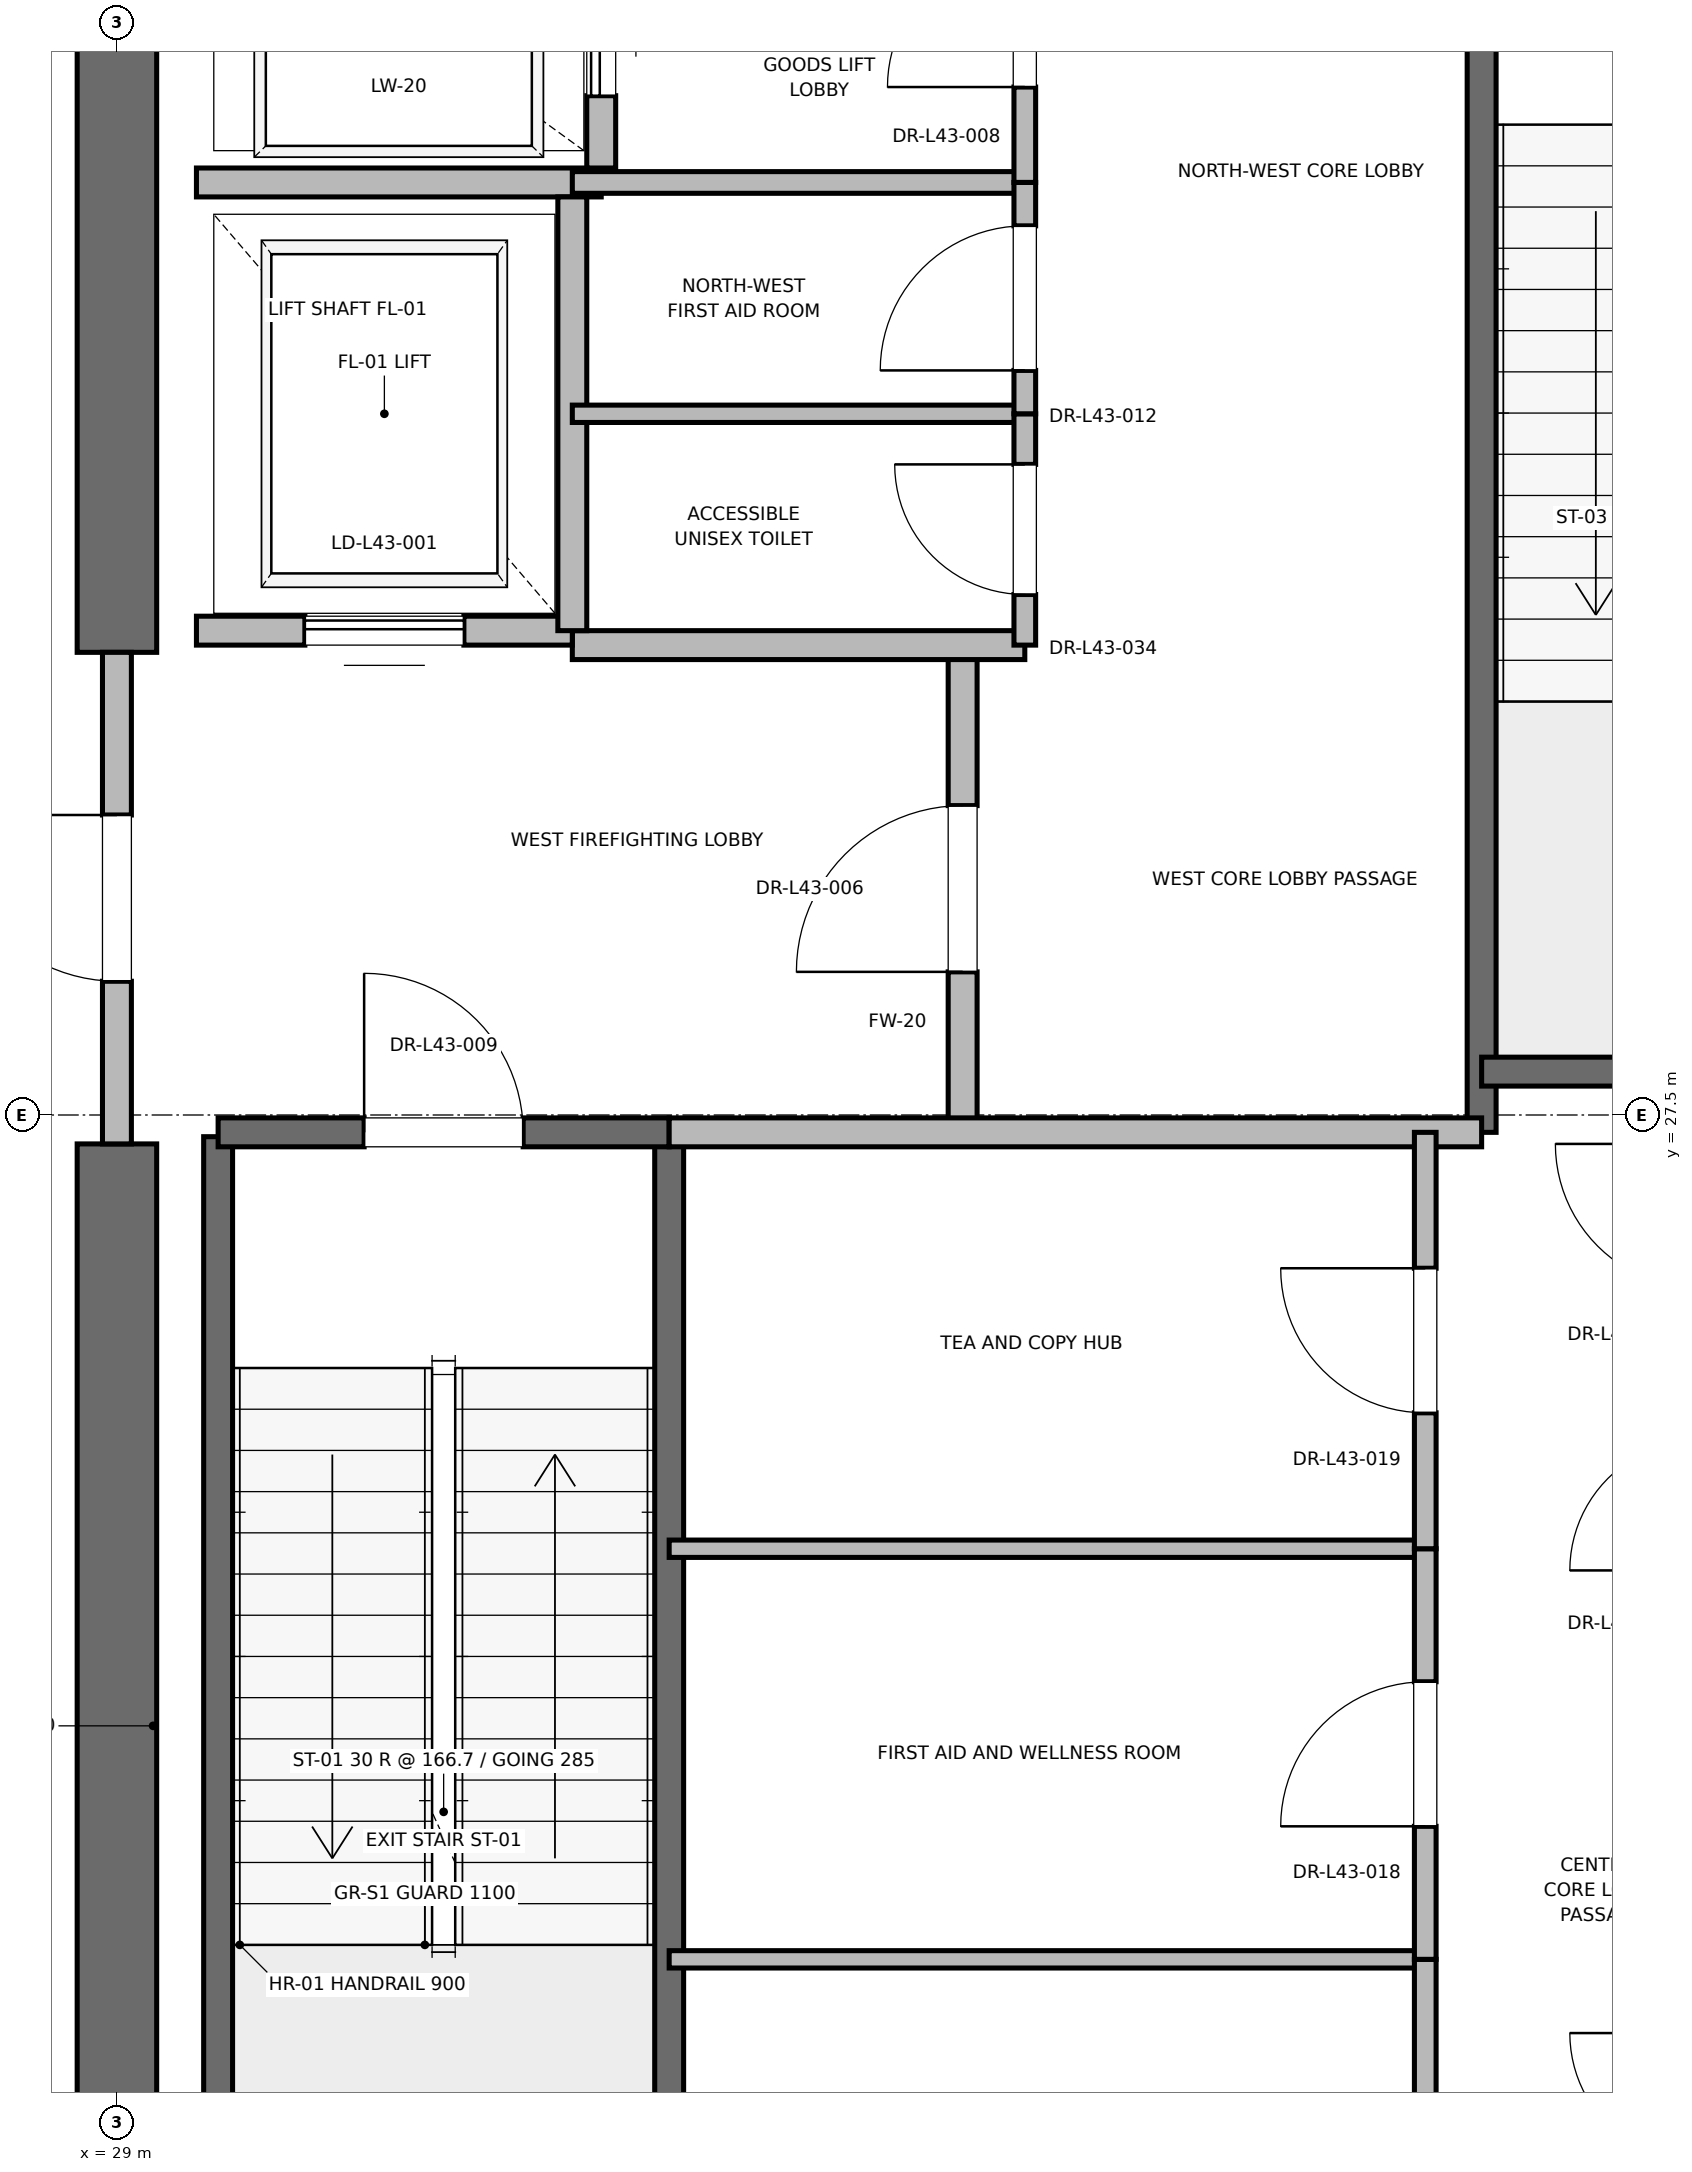
"""IFC4 building model, lengths in metres.
Left out: names, types, materials, properties, quantities, classifications, styles, units other than length and angle.
Written with IfcOpenShell. Run it as: python <this file> out.ifc"""

import sys

from ifc_helpers import new_model, si_unit, direction, frame, frame_2d, origin, place, context, subcontext, project, spatial, rectangle, extrude, element, fill, save


model = new_model("IFC4")
c1 = context("Model", 3, precision=1e-05, world=origin(), true_north=direction((0.0, 1.0)))
c2 = subcontext(c1, "Body", "Model", "MODEL_VIEW")
j1 = project(units=[si_unit("LENGTHUNIT", "METRE"), si_unit("PLANEANGLEUNIT", "RADIAN")], contexts=[c1])
p1 = place(None, origin())
s1 = spatial("IfcSite", under=j1, at=p1, CompositionType="ELEMENT")
p2 = place(p1, origin())
s2 = spatial("IfcBuilding", under=s1, at=p2, CompositionType="ELEMENT")
p3 = place(p2, frame((0.0, 0.0, 184.4)))
s3 = spatial("IfcBuildingStorey", under=s2, at=p3, CompositionType="ELEMENT", Elevation=184.4)
p4 = place(p3, frame((29.0, 18.5, 0.0), z_axis=(0.0, 0.0, 1.0), x_axis=(0.0, 1.0, 0.0)))
e1 = element("IfcWall", 1, at=p4, inside=s3, PredefinedType="SHEAR", context=c2, shape_type="SweptSolid", body=[
    extrude(rectangle(XDim=8.8, YDim=0.55, at=frame_2d((4.4, 0.0))), origin(), (0.0, 0.0, 1.0), 4.7),
])
p5 = place(p3, frame((29.0, 30.7, 0.0), z_axis=(0.0, 0.0, 1.0), x_axis=(0.0, 1.0, 0.0)))
e2 = element("IfcWall", 2, at=p5, inside=s3, PredefinedType="SHEAR", context=c2, shape_type="SweptSolid", body=[
    extrude(rectangle(XDim=5.8, YDim=0.55, at=frame_2d((2.9, 0.0))), origin(), (0.0, 0.0, 1.0), 4.7),
])
p6 = place(p3, frame((29.7, 19.2, 0.0), z_axis=(0.0, 0.0, 1.0), x_axis=(0.0, 1.0, 0.0)))
e3 = element("IfcWall", 3, at=p6, inside=s3, PredefinedType="SOLIDWALL", context=c2, shape_type="SweptSolid", body=[
    extrude(rectangle(XDim=8.15, YDim=0.2, at=frame_2d((4.075, 0.0))), origin(), (0.0, 0.0, 1.0), 4.7),
])
p7 = place(p3, frame((32.82, 18.6, 0.0), z_axis=(0.0, 0.0, 1.0), x_axis=(0.0, 1.0, 0.0)))
e4 = element("IfcWall", 4, at=p7, inside=s3, PredefinedType="SOLIDWALL", context=c2, shape_type="SweptSolid", body=[
    extrude(rectangle(XDim=8.78, YDim=0.2, at=frame_2d((4.39, 0.0))), origin(), (0.0, 0.0, 1.0), 4.7),
])
p8 = place(p3, frame((29.7, 27.38, 0.0), z_axis=(0.0, 0.0, 1.0), x_axis=(1.0, 0.0, 0.0)))
e5 = element("IfcWall", 5, at=p8, inside=s3, PredefinedType="SOLIDWALL", context=c2, shape_type="SweptSolid", body=[
    extrude(rectangle(XDim=3.12, YDim=0.2, at=frame_2d((1.56, 0.0))), origin(), (0.0, 0.0, 1.0), 4.7),
])
p9 = place(p8, frame((1.01, 0.0, 0.0)))
e6 = element("IfcOpeningElement", 6, at=p9, cuts=e5, PredefinedType="OPENING", context=c2, shape_type="SweptSolid", body=[
    extrude(rectangle(XDim=1.1, YDim=2.15, at=frame_2d((0.55, 1.075))), frame((0.0, 0.1, 0.0), z_axis=(0.0, -1.0, 0.0), x_axis=(1.0, 0.0, 0.0)), (0.0, 0.0, 1.0), 0.2),
])
p10 = place(p3, frame((38.44, 27.38, 0.0), z_axis=(0.0, 0.0, 1.0), x_axis=(0.0, 1.0, 0.0)))
e7 = element("IfcWall", 7, at=p10, inside=s3, PredefinedType="SOLIDWALL", context=c2, shape_type="SweptSolid", body=[
    extrude(rectangle(XDim=8.87, YDim=0.2, at=frame_2d((4.435, 0.0))), origin(), (0.0, 0.0, 1.0), 4.7),
])
p11 = place(p3, frame((38.44, 27.8, 0.0), z_axis=(0.0, 0.0, 1.0), x_axis=(1.0, 0.0, 0.0)))
e8 = element("IfcWall", 8, at=p11, inside=s3, PredefinedType="SOLIDWALL", context=c2, shape_type="SweptSolid", body=[
    extrude(rectangle(XDim=3.32, YDim=0.2, at=frame_2d((1.66, 0.0))), origin(), (0.0, 0.0, 1.0), 4.7),
])
p12 = place(p3, frame((34.85, 27.38, 0.0), z_axis=(0.0, 0.0, 1.0), x_axis=(0.0, 1.0, 0.0)))
e9 = element("IfcWall", 9, at=p12, inside=s3, PredefinedType="PARTITIONING", context=c2, shape_type="SweptSolid", body=[
    extrude(rectangle(XDim=3.37, YDim=0.2, at=frame_2d((1.685, 0.0))), origin(), (0.0, 0.0, 1.0), 4.7),
])
p13 = place(p12, frame((1.11, 0.0, 0.0)))
e10 = element("IfcOpeningElement", 10, at=p13, cuts=e9, PredefinedType="OPENING", context=c2, shape_type="SweptSolid", body=[
    extrude(rectangle(XDim=1.15, YDim=2.2, at=frame_2d((0.575, 1.1))), frame((0.0, 0.1, 0.0), z_axis=(0.0, -1.0, 0.0), x_axis=(1.0, 0.0, 0.0)), (0.0, 0.0, 1.0), 0.2),
])
p14 = place(p3, frame((29.0, 27.3, 0.0), z_axis=(0.0, 0.0, 1.0), x_axis=(0.0, 1.0, 0.0)))
e11 = element("IfcWall", 11, at=p14, inside=s3, PredefinedType="PARTITIONING", context=c2, shape_type="SweptSolid", body=[
    extrude(rectangle(XDim=3.4, YDim=0.2, at=frame_2d((1.7, 0.0))), origin(), (0.0, 0.0, 1.0), 3.68),
])
p15 = place(p14, frame((1.125, 0.0, 0.0)))
e12 = element("IfcOpeningElement", 12, at=p15, cuts=e11, PredefinedType="OPENING", context=c2, shape_type="SweptSolid", body=[
    extrude(rectangle(XDim=1.15, YDim=2.2, at=frame_2d((0.575, 1.1))), frame((0.0, 0.1, 0.0), z_axis=(0.0, -1.0, 0.0), x_axis=(1.0, 0.0, 0.0)), (0.0, 0.0, 1.0), 0.2),
])
p16 = place(p3, frame((32.82, 27.38, 0.0), z_axis=(0.0, 0.0, 1.0), x_axis=(1.0, 0.0, 0.0)))
e13 = element("IfcWall", 13, at=p16, inside=s3, PredefinedType="PARTITIONING", context=c2, shape_type="SweptSolid", body=[
    extrude(rectangle(XDim=5.62, YDim=0.2, at=frame_2d((2.81, 0.0))), origin(), (0.0, 0.0, 1.0), 4.7),
])
p17 = place(p3, frame((32.15, 30.75, 0.0), z_axis=(0.0, 0.0, 1.0), x_axis=(1.0, 0.0, 0.0)))
e14 = element("IfcWall", 14, at=p17, inside=s3, PredefinedType="PARTITIONING", context=c2, shape_type="SweptSolid", body=[
    extrude(rectangle(XDim=3.13, YDim=0.2, at=frame_2d((1.565, 0.0))), origin(), (0.0, 0.0, 1.0), 4.7),
])
p18 = place(p3, frame((29.55, 30.85, 0.0), z_axis=(0.0, 0.0, 1.0), x_axis=(1.0, 0.0, 0.0)))
e15 = element("IfcWall", 15, at=p18, inside=s3, PredefinedType="SOLIDWALL", context=c2, shape_type="SweptSolid", body=[
    extrude(rectangle(XDim=2.6, YDim=0.2, at=frame_2d((1.3, 0.0))), origin(), (0.0, 0.0, 1.0), 3.68),
])
p19 = place(p18, frame((0.75, 0.0, 0.0)))
e16 = element("IfcOpeningElement", 16, at=p19, cuts=e15, PredefinedType="OPENING", context=c2, shape_type="SweptSolid", body=[
    extrude(rectangle(XDim=1.1, YDim=2.2, at=frame_2d((0.55, 1.1))), frame((0.0, 0.1, 0.0), z_axis=(0.0, -1.0, 0.0), x_axis=(1.0, 0.0, 0.0)), (0.0, 0.0, 1.0), 0.2),
])
p20 = place(p3, frame((29.55, 33.95, 0.0), z_axis=(0.0, 0.0, 1.0), x_axis=(1.0, 0.0, 0.0)))
e17 = element("IfcWall", 17, at=p20, inside=s3, PredefinedType="SOLIDWALL", context=c2, shape_type="SweptSolid", body=[
    extrude(rectangle(XDim=2.8, YDim=0.2, at=frame_2d((1.4, 0.0))), origin(), (0.0, 0.0, 1.0), 4.7),
])
p21 = place(p3, frame((32.15, 30.85, 0.0), z_axis=(0.0, 0.0, 1.0), x_axis=(0.0, 1.0, 0.0)))
e18 = element("IfcWall", 18, at=p21, inside=s3, PredefinedType="SOLIDWALL", context=c2, shape_type="SweptSolid", body=[
    extrude(rectangle(XDim=3.0, YDim=0.2, at=frame_2d((1.5, 0.0))), origin(), (0.0, 0.0, 1.0), 4.7),
])
p22 = place(p3, frame((32.35, 34.05, 0.0), z_axis=(0.0, 0.0, 1.0), x_axis=(0.0, 1.0, 0.0)))
e19 = element("IfcWall", 19, at=p22, inside=s3, PredefinedType="SOLIDWALL", context=c2, shape_type="SweptSolid", body=[
    extrude(rectangle(XDim=2.1, YDim=0.2, at=frame_2d((1.05, 0.0))), origin(), (0.0, 0.0, 1.0), 4.7),
])
p23 = place(p22, frame((0.5, 0.0, 0.0)))
e20 = element("IfcOpeningElement", 20, at=p23, cuts=e19, PredefinedType="OPENING", context=c2, shape_type="SweptSolid", body=[
    extrude(rectangle(XDim=1.1, YDim=2.2, at=frame_2d((0.55, 1.1))), frame((0.0, 0.1, 0.0), z_axis=(0.0, -1.0, 0.0), x_axis=(1.0, 0.0, 0.0)), (0.0, 0.0, 1.0), 0.2),
])
p24 = place(p3, frame((32.15, 33.95, 0.0), z_axis=(0.0, 0.0, 1.0), x_axis=(1.0, 0.0, 0.0)))
e21 = element("IfcWall", 21, at=p24, inside=s3, PredefinedType="PARTITIONING", context=c2, shape_type="SweptSolid", body=[
    extrude(rectangle(XDim=3.13, YDim=0.15, at=frame_2d((1.565, 0.0))), origin(), (0.0, 0.0, 1.0), 2.85),
])
p25 = place(p3, frame((35.28, 33.95, 0.0), z_axis=(0.0, 0.0, 1.0), x_axis=(0.0, 1.0, 0.0)))
e22 = element("IfcWall", 22, at=p25, inside=s3, PredefinedType="PARTITIONING", context=c2, shape_type="SweptSolid", body=[
    extrude(rectangle(XDim=2.27, YDim=0.15, at=frame_2d((1.135, 0.0))), origin(), (0.0, 0.0, 1.0), 2.85),
])
p26 = place(p25, frame((0.66, 0.0, 0.0)))
e23 = element("IfcOpeningElement", 23, at=p26, cuts=e22, PredefinedType="OPENING", context=c2, shape_type="SweptSolid", body=[
    extrude(rectangle(XDim=0.95, YDim=2.15, at=frame_2d((0.475, 1.075))), frame((0.0, 0.075, 0.0), z_axis=(0.0, -1.0, 0.0), x_axis=(1.0, 0.0, 0.0)), (0.0, 0.0, 1.0), 0.15),
])
p27 = place(p3, frame((32.15, 32.35, 0.0), z_axis=(0.0, 0.0, 1.0), x_axis=(1.0, 0.0, 0.0)))
e24 = element("IfcWall", 24, at=p27, inside=s3, PredefinedType="PARTITIONING", context=c2, shape_type="SweptSolid", body=[
    extrude(rectangle(XDim=3.13, YDim=0.12, at=frame_2d((1.565, 0.0))), origin(), (0.0, 0.0, 1.0), 2.85),
])
p28 = place(p3, frame((35.28, 30.75, 0.0), z_axis=(0.0, 0.0, 1.0), x_axis=(0.0, 1.0, 0.0)))
e25 = element("IfcWall", 25, at=p28, inside=s3, PredefinedType="PARTITIONING", context=c2, shape_type="SweptSolid", body=[
    extrude(rectangle(XDim=1.6, YDim=0.15, at=frame_2d((0.8, 0.0))), origin(), (0.0, 0.0, 1.0), 2.85),
])
p29 = place(p28, frame((0.35, 0.0, 0.0)))
e26 = element("IfcOpeningElement", 26, at=p29, cuts=e25, PredefinedType="OPENING", context=c2, shape_type="SweptSolid", body=[
    extrude(rectangle(XDim=0.9, YDim=2.1, at=frame_2d((0.45, 1.05))), frame((0.0, 0.075, 0.0), z_axis=(0.0, -1.0, 0.0), x_axis=(1.0, 0.0, 0.0)), (0.0, 0.0, 1.0), 0.15),
])
p30 = place(p3, frame((35.28, 32.35, 0.0), z_axis=(0.0, 0.0, 1.0), x_axis=(0.0, 1.0, 0.0)))
e27 = element("IfcWall", 27, at=p30, inside=s3, PredefinedType="PARTITIONING", context=c2, shape_type="SweptSolid", body=[
    extrude(rectangle(XDim=1.6, YDim=0.15, at=frame_2d((0.8, 0.0))), origin(), (0.0, 0.0, 1.0), 2.85),
])
p31 = place(p30, frame((0.3, 0.0, 0.0)))
e28 = element("IfcOpeningElement", 28, at=p31, cuts=e27, PredefinedType="OPENING", context=c2, shape_type="SweptSolid", body=[
    extrude(rectangle(XDim=1.0, YDim=2.15, at=frame_2d((0.5, 1.075))), frame((0.0, 0.075, 0.0), z_axis=(0.0, -1.0, 0.0), x_axis=(1.0, 0.0, 0.0)), (0.0, 0.0, 1.0), 0.15),
])
for number, where, z_axis, x_axis in (
    (29, (32.82, 21.66, 0.0), (0.0, 0.0, 1.0), (1.0, 0.0, 0.0)),
    (30, (32.82, 24.5, 0.0), (0.0, 0.0, 1.0), (1.0, 0.0, 0.0)),
):
    element("IfcWall", number, at=place(p3, frame(where, z_axis=z_axis, x_axis=x_axis)), inside=s3, PredefinedType="PARTITIONING", context=c2, shape_type="SweptSolid", body=[
        extrude(rectangle(XDim=5.23, YDim=0.12, at=frame_2d((2.615, 0.0))), origin(), (0.0, 0.0, 1.0), 2.85),
    ])
p32 = place(p3, frame((38.05, 18.6, 0.0), z_axis=(0.0, 0.0, 1.0), x_axis=(0.0, 1.0, 0.0)))
e31 = element("IfcWall", 31, at=p32, inside=s3, PredefinedType="PARTITIONING", context=c2, shape_type="SweptSolid", body=[
    extrude(rectangle(XDim=3.06, YDim=0.15, at=frame_2d((1.53, 0.0))), origin(), (0.0, 0.0, 1.0), 2.85),
])
p33 = place(p32, frame((1.03, 0.0, 0.0)))
e32 = element("IfcOpeningElement", 32, at=p33, cuts=e31, PredefinedType="OPENING", context=c2, shape_type="SweptSolid", body=[
    extrude(rectangle(XDim=1.0, YDim=2.15, at=frame_2d((0.5, 1.075))), frame((0.0, 0.075, 0.0), z_axis=(0.0, -1.0, 0.0), x_axis=(1.0, 0.0, 0.0)), (0.0, 0.0, 1.0), 0.15),
])
p34 = place(p3, frame((38.05, 21.66, 0.0), z_axis=(0.0, 0.0, 1.0), x_axis=(0.0, 1.0, 0.0)))
e33 = element("IfcWall", 33, at=p34, inside=s3, PredefinedType="PARTITIONING", context=c2, shape_type="SweptSolid", body=[
    extrude(rectangle(XDim=2.84, YDim=0.15, at=frame_2d((1.42, 0.0))), origin(), (0.0, 0.0, 1.0), 2.85),
])
p35 = place(p34, frame((0.92, 0.0, 0.0)))
e34 = element("IfcOpeningElement", 34, at=p35, cuts=e33, PredefinedType="OPENING", context=c2, shape_type="SweptSolid", body=[
    extrude(rectangle(XDim=1.0, YDim=2.15, at=frame_2d((0.5, 1.075))), frame((0.0, 0.075, 0.0), z_axis=(0.0, -1.0, 0.0), x_axis=(1.0, 0.0, 0.0)), (0.0, 0.0, 1.0), 0.15),
])
p36 = place(p3, frame((38.05, 24.5, 0.0), z_axis=(0.0, 0.0, 1.0), x_axis=(0.0, 1.0, 0.0)))
e35 = element("IfcWall", 35, at=p36, inside=s3, PredefinedType="PARTITIONING", context=c2, shape_type="SweptSolid", body=[
    extrude(rectangle(XDim=2.88, YDim=0.15, at=frame_2d((1.44, 0.0))), origin(), (0.0, 0.0, 1.0), 2.85),
])
p37 = place(p36, frame((0.94, 0.0, 0.0)))
e36 = element("IfcOpeningElement", 36, at=p37, cuts=e35, PredefinedType="OPENING", context=c2, shape_type="SweptSolid", body=[
    extrude(rectangle(XDim=1.0, YDim=2.15, at=frame_2d((0.5, 1.075))), frame((0.0, 0.075, 0.0), z_axis=(0.0, -1.0, 0.0), x_axis=(1.0, 0.0, 0.0)), (0.0, 0.0, 1.0), 0.15),
])
p38 = place(p9, origin())
e37 = element("IfcDoor", 37, at=p38, inside=s3, OperationType="SINGLE_SWING_LEFT", PredefinedType="DOOR", context=c2, shape_type="SweptSolid", body=[
    extrude(rectangle(XDim=1.1, YDim=2.15, at=frame_2d((0.55, 1.075))), frame((0.0, 0.025, 0.0), z_axis=(0.0, -1.0, 0.0), x_axis=(1.0, 0.0, 0.0)), (0.0, 0.0, 1.0), 0.05),
])
fill(e6, e37)
p39 = place(p13, origin())
e38 = element("IfcDoor", 38, at=p39, inside=s3, OperationType="SINGLE_SWING_LEFT", PredefinedType="DOOR", context=c2, shape_type="SweptSolid", body=[
    extrude(rectangle(XDim=1.15, YDim=2.2, at=frame_2d((0.575, 1.1))), frame((0.0, 0.025, 0.0), z_axis=(0.0, -1.0, 0.0), x_axis=(1.0, 0.0, 0.0)), (0.0, 0.0, 1.0), 0.05),
])
fill(e10, e38)
p40 = place(p15, origin())
e39 = element("IfcDoor", 39, at=p40, inside=s3, OperationType="SINGLE_SWING_RIGHT", PredefinedType="DOOR", context=c2, shape_type="SweptSolid", body=[
    extrude(rectangle(XDim=1.15, YDim=2.2, at=frame_2d((0.575, 1.1))), frame((0.0, 0.025, 0.0), z_axis=(0.0, -1.0, 0.0), x_axis=(1.0, 0.0, 0.0)), (0.0, 0.0, 1.0), 0.05),
])
fill(e12, e39)
p41 = place(p19, origin())
e40 = element("IfcDoor", 40, at=p41, inside=s3, OperationType="SLIDING_TO_RIGHT", PredefinedType="DOOR", context=c2, shape_type="SweptSolid", body=[
    extrude(rectangle(XDim=1.1, YDim=2.2, at=frame_2d((0.55, 1.1))), frame((0.0, 0.025, 0.0), z_axis=(0.0, -1.0, 0.0), x_axis=(1.0, 0.0, 0.0)), (0.0, 0.0, 1.0), 0.05),
])
fill(e16, e40)
p42 = place(p23, origin())
e41 = element("IfcDoor", 41, at=p42, inside=s3, OperationType="SLIDING_TO_RIGHT", PredefinedType="DOOR", context=c2, shape_type="SweptSolid", body=[
    extrude(rectangle(XDim=1.1, YDim=2.2, at=frame_2d((0.55, 1.1))), frame((0.0, 0.025, 0.0), z_axis=(0.0, -1.0, 0.0), x_axis=(1.0, 0.0, 0.0)), (0.0, 0.0, 1.0), 0.05),
])
fill(e20, e41)
p43 = place(p26, origin())
e42 = element("IfcDoor", 42, at=p43, inside=s3, OperationType="SINGLE_SWING_LEFT", PredefinedType="DOOR", context=c2, shape_type="SweptSolid", body=[
    extrude(rectangle(XDim=0.95, YDim=2.15, at=frame_2d((0.475, 1.075))), frame((0.0, 0.025, 0.0), z_axis=(0.0, -1.0, 0.0), x_axis=(1.0, 0.0, 0.0)), (0.0, 0.0, 1.0), 0.05),
])
fill(e23, e42)
p44 = place(p29, origin())
e43 = element("IfcDoor", 43, at=p44, inside=s3, OperationType="SINGLE_SWING_RIGHT", PredefinedType="DOOR", context=c2, shape_type="SweptSolid", body=[
    extrude(rectangle(XDim=0.9, YDim=2.1, at=frame_2d((0.45, 1.05))), frame((0.0, 0.025, 0.0), z_axis=(0.0, -1.0, 0.0), x_axis=(1.0, 0.0, 0.0)), (0.0, 0.0, 1.0), 0.05),
])
fill(e26, e43)
p45 = place(p31, origin())
e44 = element("IfcDoor", 44, at=p45, inside=s3, OperationType="SINGLE_SWING_LEFT", PredefinedType="DOOR", context=c2, shape_type="SweptSolid", body=[
    extrude(rectangle(XDim=1.0, YDim=2.15, at=frame_2d((0.5, 1.075))), frame((0.0, 0.025, 0.0), z_axis=(0.0, -1.0, 0.0), x_axis=(1.0, 0.0, 0.0)), (0.0, 0.0, 1.0), 0.05),
])
fill(e28, e44)
p46 = place(p35, origin())
e45 = element("IfcDoor", 45, at=p46, inside=s3, OperationType="SINGLE_SWING_LEFT", PredefinedType="DOOR", context=c2, shape_type="SweptSolid", body=[
    extrude(rectangle(XDim=1.0, YDim=2.15, at=frame_2d((0.5, 1.075))), frame((0.0, 0.025, 0.0), z_axis=(0.0, -1.0, 0.0), x_axis=(1.0, 0.0, 0.0)), (0.0, 0.0, 1.0), 0.05),
])
fill(e34, e45)
p47 = place(p37, origin())
e46 = element("IfcDoor", 46, at=p47, inside=s3, OperationType="SINGLE_SWING_RIGHT", PredefinedType="DOOR", context=c2, shape_type="SweptSolid", body=[
    extrude(rectangle(XDim=1.0, YDim=2.15, at=frame_2d((0.5, 1.075))), frame((0.0, 0.025, 0.0), z_axis=(0.0, -1.0, 0.0), x_axis=(1.0, 0.0, 0.0)), (0.0, 0.0, 1.0), 0.05),
])
fill(e36, e46)
save(model, sys.argv[1])
